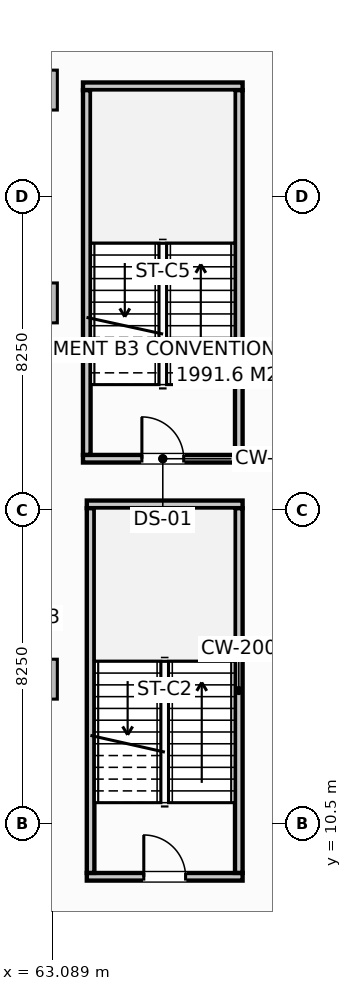
"""IFC4 building model, lengths in metres.
Left out: names, types, materials, properties, quantities, classifications, styles, units other than length and angle.
Written with IfcOpenShell. Run it as: python <this file> out.ifc"""

import sys

from ifc_helpers import new_model, si_unit, direction, frame, frame_2d, origin, origin_2d, place, context, subcontext, project, spatial, rectangle, extrude, element, fill, save


model = new_model("IFC4")
c1 = context("Model", 3, precision=1e-05, world=origin(), true_north=direction((0.0, 1.0)))
c2 = subcontext(c1, "Body", "Model", "MODEL_VIEW")
j1 = project(units=[si_unit("LENGTHUNIT", "METRE"), si_unit("PLANEANGLEUNIT", "RADIAN")], contexts=[c1])
p1 = place(None, origin())
s1 = spatial("IfcSite", under=j1, at=p1, CompositionType="ELEMENT")
p2 = place(p1, origin())
s2 = spatial("IfcBuilding", under=s1, at=p2, CompositionType="ELEMENT")
p3 = place(p2, frame((0.0, 0.0, -13.5)))
s3 = spatial("IfcBuildingStorey", under=s2, at=p3, CompositionType="ELEMENT", Elevation=-13.5)
for number, where, z_axis, x_axis in (
    (1, (62.7, 14.3, -0.5), (0.0, 0.0, 1.0), (1.0, 0.0, 0.0)),
    (2, (62.7, 24.2, -0.5), (0.0, 0.0, 1.0), (1.0, 0.0, 0.0)),
    (3, (62.7, 29.8, -0.5), (0.0, 0.0, 1.0), (1.0, 0.0, 0.0)),
):
    element("IfcColumn", number, at=place(p3, frame(where, z_axis=z_axis, x_axis=x_axis)), inside=s3, PredefinedType="COLUMN", context=c2, shape_type="SweptSolid", body=[
        extrude(rectangle(XDim=1.05, YDim=1.05, at=origin_2d()), origin(), (0.0, 0.0, 1.0), 4.68),
    ])
p4 = place(p3, frame((64.0, 9.1, -0.5), z_axis=(0.0, 0.0, 1.0), x_axis=(1.0, 0.0, 0.0)))
e4 = element("IfcWall", 4, at=p4, inside=s3, PredefinedType="SHEAR", context=c2, shape_type="SweptSolid", body=[
    extrude(rectangle(XDim=4.1, YDim=0.2, at=frame_2d((2.05, 0.0))), origin(), (0.0, 0.0, 1.0), 4.68),
])
p5 = place(p4, frame((1.5, 0.0, 0.5)))
e5 = element("IfcOpeningElement", 5, at=p5, cuts=e4, PredefinedType="OPENING", context=c2, shape_type="SweptSolid", body=[
    extrude(rectangle(XDim=1.1, YDim=2.15, at=frame_2d((0.55, 1.075))), frame((0.0, 0.11, 0.0), z_axis=(0.0, -1.0, 0.0), x_axis=(1.0, 0.0, 0.0)), (0.0, 0.0, 1.0), 0.22),
])
p6 = place(p3, frame((64.0, 18.9, -0.5), z_axis=(0.0, 0.0, 1.0), x_axis=(1.0, 0.0, 0.0)))
e6 = element("IfcWall", 6, at=p6, inside=s3, PredefinedType="SHEAR", context=c2, shape_type="SweptSolid", body=[
    extrude(rectangle(XDim=4.1, YDim=0.2, at=frame_2d((2.05, 0.0))), origin(), (0.0, 0.0, 1.0), 4.68),
])
for number, where, z_axis, x_axis in (
    (7, (64.1, 9.202, -0.5), (0.0, 0.0, 1.0), (0.0, 1.0, 0.0)),
    (8, (68.0, 9.202, -0.5), (0.0, 0.0, 1.0), (0.0, 1.0, 0.0)),
):
    element("IfcWall", number, at=place(p3, frame(where, z_axis=z_axis, x_axis=x_axis)), inside=s3, PredefinedType="SHEAR", context=c2, shape_type="SweptSolid", body=[
        extrude(rectangle(XDim=9.596, YDim=0.2, at=frame_2d((4.798, 0.0))), origin(), (0.0, 0.0, 1.0), 4.68),
    ])
p7 = place(p3, frame((63.9, 20.1, -0.5), z_axis=(0.0, 0.0, 1.0), x_axis=(1.0, 0.0, 0.0)))
e9 = element("IfcWall", 9, at=p7, inside=s3, PredefinedType="SHEAR", context=c2, shape_type="SweptSolid", body=[
    extrude(rectangle(XDim=4.2, YDim=0.2, at=frame_2d((2.1, 0.0))), origin(), (0.0, 0.0, 1.0), 4.68),
])
p8 = place(p7, frame((1.55, 0.0, 0.5)))
e10 = element("IfcOpeningElement", 10, at=p8, cuts=e9, PredefinedType="OPENING", context=c2, shape_type="SweptSolid", body=[
    extrude(rectangle(XDim=1.1, YDim=2.15, at=frame_2d((0.55, 1.075))), frame((0.0, 0.11, 0.0), z_axis=(0.0, -1.0, 0.0), x_axis=(1.0, 0.0, 0.0)), (0.0, 0.0, 1.0), 0.22),
])
p9 = place(p3, frame((63.9, 29.9, -0.5), z_axis=(0.0, 0.0, 1.0), x_axis=(1.0, 0.0, 0.0)))
e11 = element("IfcWall", 11, at=p9, inside=s3, PredefinedType="SHEAR", context=c2, shape_type="SweptSolid", body=[
    extrude(rectangle(XDim=4.2, YDim=0.2, at=frame_2d((2.1, 0.0))), origin(), (0.0, 0.0, 1.0), 4.68),
])
for number, where, z_axis, x_axis in (
    (12, (64.0, 20.202, -0.5), (0.0, 0.0, 1.0), (0.0, 1.0, 0.0)),
    (13, (68.0, 20.202, -0.5), (0.0, 0.0, 1.0), (0.0, 1.0, 0.0)),
):
    element("IfcWall", number, at=place(p3, frame(where, z_axis=z_axis, x_axis=x_axis)), inside=s3, PredefinedType="SHEAR", context=c2, shape_type="SweptSolid", body=[
        extrude(rectangle(XDim=9.596, YDim=0.2, at=frame_2d((4.798, 0.0))), origin(), (0.0, 0.0, 1.0), 4.68),
    ])
p10 = place(p5, origin())
e14 = element("IfcDoor", 14, at=p10, inside=s3, OperationType="SINGLE_SWING_LEFT", PredefinedType="DOOR", context=c2, shape_type="SweptSolid", body=[
    extrude(rectangle(XDim=1.1, YDim=2.15, at=frame_2d((0.55, 1.075))), frame((0.0, 0.025, 0.0), z_axis=(0.0, -1.0, 0.0), x_axis=(1.0, 0.0, 0.0)), (0.0, 0.0, 1.0), 0.05),
])
fill(e5, e14)
p11 = place(p8, origin())
e15 = element("IfcDoor", 15, at=p11, inside=s3, OperationType="SINGLE_SWING_LEFT", PredefinedType="DOOR", context=c2, shape_type="SweptSolid", body=[
    extrude(rectangle(XDim=1.1, YDim=2.15, at=frame_2d((0.55, 1.075))), frame((0.0, 0.025, 0.0), z_axis=(0.0, -1.0, 0.0), x_axis=(1.0, 0.0, 0.0)), (0.0, 0.0, 1.0), 0.05),
])
fill(e10, e15)
save(model, sys.argv[1])
